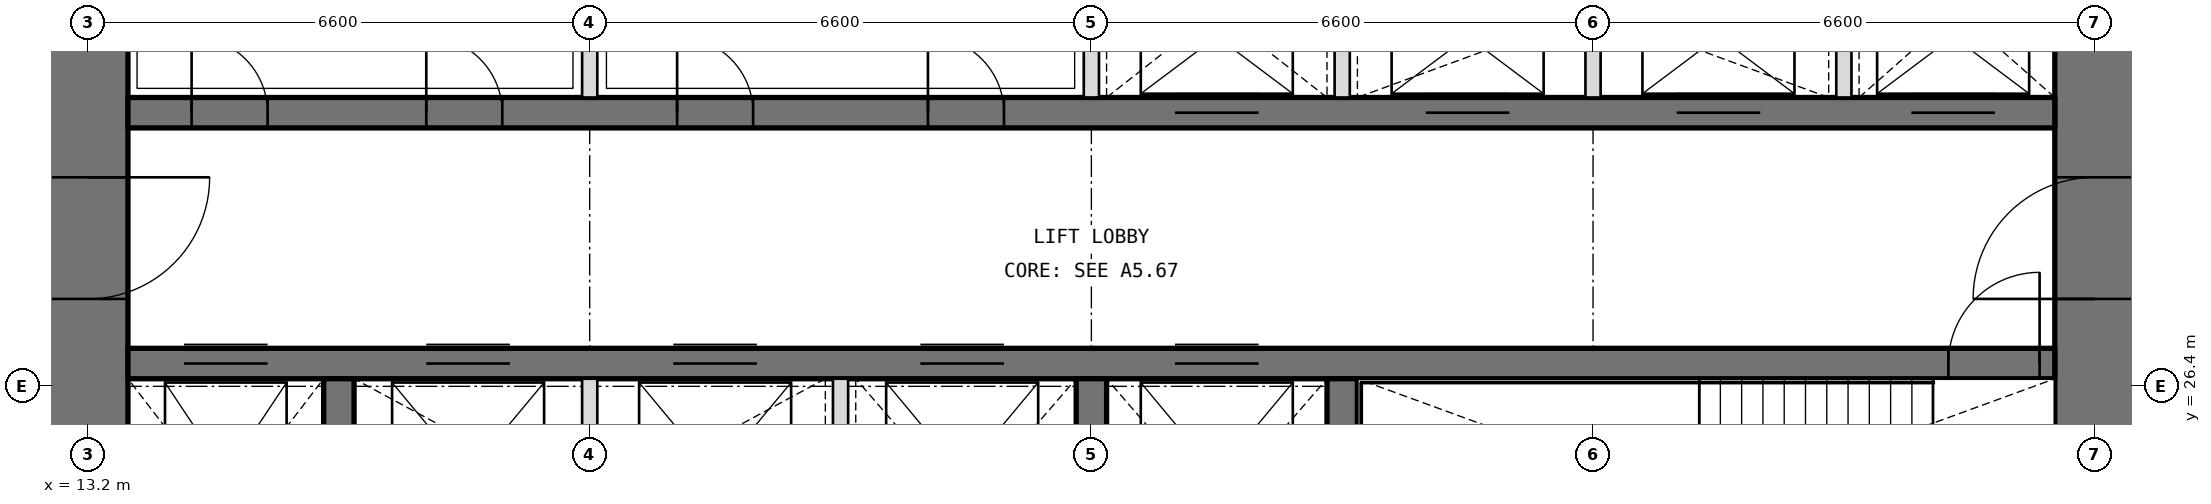
"""IFC4 building model, lengths in metres.
Left out: names, types, materials, properties, quantities, classifications, styles, units other than length and angle.
Written with IfcOpenShell. Run it as: python <this file> out.ifc"""

import sys

from ifc_helpers import new_model, si_unit, direction, frame, frame_2d, origin, place, context, subcontext, project, spatial, rectangle, extrude, element, fill, save


model = new_model("IFC4")
c1 = context("Model", 3, precision=1e-05, world=origin(), true_north=direction((0.0, 1.0)))
c2 = subcontext(c1, "Body", "Model", "MODEL_VIEW")
j1 = project(units=[si_unit("LENGTHUNIT", "METRE"), si_unit("PLANEANGLEUNIT", "RADIAN")], contexts=[c1])
p1 = place(None, origin())
s1 = spatial("IfcSite", under=j1, at=p1, CompositionType="ELEMENT")
p2 = place(p1, origin())
s2 = spatial("IfcBuilding", under=s1, at=p2, CompositionType="ELEMENT")
p3 = place(p2, frame((0.0, 0.0, 283.8)))
s3 = spatial("IfcBuildingStorey", under=s2, at=p3, CompositionType="ELEMENT", Elevation=283.8)
p4 = place(p3, frame((39.6, 13.725, 0.0), z_axis=(0.0, 0.0, 1.0), x_axis=(0.0, 1.0, 0.0)))
e1 = element("IfcWall", 1, at=p4, inside=s3, PredefinedType="SHEAR", context=c2, shape_type="SweptSolid", body=[
    extrude(rectangle(XDim=18.75, YDim=1.05, at=frame_2d((9.375, 0.0))), origin(), (0.0, 0.0, 1.0), 4.2),
])
p5 = place(p4, frame((3.025, 0.0, 0.0)))
e2 = element("IfcOpeningElement", 2, at=p5, cuts=e1, PredefinedType="OPENING", context=c2, shape_type="SweptSolid", body=[
    extrude(rectangle(XDim=1.6, YDim=2.1, at=frame_2d((0.8, 1.05))), frame((0.0, 0.535, 0.0), z_axis=(0.0, -1.0, 0.0), x_axis=(1.0, 0.0, 0.0)), (0.0, 0.0, 1.0), 1.07),
])
p6 = place(p4, frame((13.825, 0.0, 0.0)))
e3 = element("IfcOpeningElement", 3, at=p6, cuts=e1, PredefinedType="OPENING", context=c2, shape_type="SweptSolid", body=[
    extrude(rectangle(XDim=1.6, YDim=2.1, at=frame_2d((0.8, 1.05))), frame((0.0, 0.535, 0.0), z_axis=(0.0, -1.0, 0.0), x_axis=(1.0, 0.0, 0.0)), (0.0, 0.0, 1.0), 1.07),
])
p7 = place(p3, frame((13.2, 32.475, 0.0), z_axis=(0.0, 0.0, 1.0), x_axis=(0.0, -1.0, 0.0)))
e4 = element("IfcWall", 4, at=p7, inside=s3, PredefinedType="SHEAR", context=c2, shape_type="SweptSolid", body=[
    extrude(rectangle(XDim=18.75, YDim=1.05, at=frame_2d((9.375, 0.0))), origin(), (0.0, 0.0, 1.0), 4.2),
])
p8 = place(p7, frame((14.125, 0.0, 0.0)))
e5 = element("IfcOpeningElement", 5, at=p8, cuts=e4, PredefinedType="OPENING", context=c2, shape_type="SweptSolid", body=[
    extrude(rectangle(XDim=1.6, YDim=2.1, at=frame_2d((0.8, 1.05))), frame((0.0, 0.535, 0.0), z_axis=(0.0, -1.0, 0.0), x_axis=(1.0, 0.0, 0.0)), (0.0, 0.0, 1.0), 1.07),
])
p9 = place(p7, frame((3.325, 0.0, 0.0)))
e6 = element("IfcOpeningElement", 6, at=p9, cuts=e4, PredefinedType="OPENING", context=c2, shape_type="SweptSolid", body=[
    extrude(rectangle(XDim=1.6, YDim=2.1, at=frame_2d((0.8, 1.05))), frame((0.0, 0.535, 0.0), z_axis=(0.0, -1.0, 0.0), x_axis=(1.0, 0.0, 0.0)), (0.0, 0.0, 1.0), 1.07),
])
p10 = place(p3, frame((13.725, 26.7, 0.0), z_axis=(0.0, 0.0, 1.0), x_axis=(1.0, 0.0, 0.0)))
e7 = element("IfcWall", 7, at=p10, inside=s3, PredefinedType="SHEAR", context=c2, shape_type="SweptSolid", body=[
    extrude(rectangle(XDim=25.35, YDim=0.4, at=frame_2d((12.675, 0.0))), origin(), (0.0, 0.0, 1.0), 4.2),
])
p11 = place(p10, frame((23.95, 0.0, 0.0)))
e8 = element("IfcOpeningElement", 8, at=p11, cuts=e7, PredefinedType="OPENING", context=c2, shape_type="SweptSolid", body=[
    extrude(rectangle(XDim=1.2, YDim=2.1, at=frame_2d((0.6, 1.05))), frame((0.0, 0.21, 0.0), z_axis=(0.0, -1.0, 0.0), x_axis=(1.0, 0.0, 0.0)), (0.0, 0.0, 1.0), 0.42),
])
p12 = place(p10, frame((0.738, 0.0, 0.0)))
e9 = element("IfcOpeningElement", 9, at=p12, cuts=e7, PredefinedType="OPENING", context=c2, shape_type="SweptSolid", body=[
    extrude(rectangle(XDim=1.1, YDim=2.1, at=frame_2d((0.55, 1.05))), frame((0.0, 0.21, 0.0), z_axis=(0.0, -1.0, 0.0), x_axis=(1.0, 0.0, 0.0)), (0.0, 0.0, 1.0), 0.42),
])
p13 = place(p10, frame((3.925, 0.0, 0.0)))
e10 = element("IfcOpeningElement", 10, at=p13, cuts=e7, PredefinedType="OPENING", context=c2, shape_type="SweptSolid", body=[
    extrude(rectangle(XDim=1.1, YDim=2.1, at=frame_2d((0.55, 1.05))), frame((0.0, 0.21, 0.0), z_axis=(0.0, -1.0, 0.0), x_axis=(1.0, 0.0, 0.0)), (0.0, 0.0, 1.0), 0.42),
])
p14 = place(p10, frame((7.175, 0.0, 0.0)))
e11 = element("IfcOpeningElement", 11, at=p14, cuts=e7, PredefinedType="OPENING", context=c2, shape_type="SweptSolid", body=[
    extrude(rectangle(XDim=1.1, YDim=2.1, at=frame_2d((0.55, 1.05))), frame((0.0, 0.21, 0.0), z_axis=(0.0, -1.0, 0.0), x_axis=(1.0, 0.0, 0.0)), (0.0, 0.0, 1.0), 0.42),
])
p15 = place(p10, frame((10.425, 0.0, 0.0)))
e12 = element("IfcOpeningElement", 12, at=p15, cuts=e7, PredefinedType="OPENING", context=c2, shape_type="SweptSolid", body=[
    extrude(rectangle(XDim=1.1, YDim=2.1, at=frame_2d((0.55, 1.05))), frame((0.0, 0.21, 0.0), z_axis=(0.0, -1.0, 0.0), x_axis=(1.0, 0.0, 0.0)), (0.0, 0.0, 1.0), 0.42),
])
p16 = place(p10, frame((13.775, 0.0, 0.0)))
e13 = element("IfcOpeningElement", 13, at=p16, cuts=e7, PredefinedType="OPENING", context=c2, shape_type="SweptSolid", body=[
    extrude(rectangle(XDim=1.1, YDim=2.1, at=frame_2d((0.55, 1.05))), frame((0.0, 0.21, 0.0), z_axis=(0.0, -1.0, 0.0), x_axis=(1.0, 0.0, 0.0)), (0.0, 0.0, 1.0), 0.42),
])
p17 = place(p3, frame((13.725, 30.0, 0.0), z_axis=(0.0, 0.0, 1.0), x_axis=(1.0, 0.0, 0.0)))
e14 = element("IfcWall", 14, at=p17, inside=s3, PredefinedType="SHEAR", context=c2, shape_type="SweptSolid", body=[
    extrude(rectangle(XDim=25.35, YDim=0.4, at=frame_2d((12.675, 0.0))), origin(), (0.0, 0.0, 1.0), 4.2),
])
p18 = place(p17, frame((0.837, 0.0, 0.0)))
e15 = element("IfcOpeningElement", 15, at=p18, cuts=e14, PredefinedType="OPENING", context=c2, shape_type="SweptSolid", body=[
    extrude(rectangle(XDim=1.0, YDim=2.1, at=frame_2d((0.5, 1.05))), frame((0.0, 0.21, 0.0), z_axis=(0.0, -1.0, 0.0), x_axis=(1.0, 0.0, 0.0)), (0.0, 0.0, 1.0), 0.42),
])
p19 = place(p17, frame((3.925, 0.0, 0.0)))
e16 = element("IfcOpeningElement", 16, at=p19, cuts=e14, PredefinedType="OPENING", context=c2, shape_type="SweptSolid", body=[
    extrude(rectangle(XDim=1.0, YDim=2.1, at=frame_2d((0.5, 1.05))), frame((0.0, 0.21, 0.0), z_axis=(0.0, -1.0, 0.0), x_axis=(1.0, 0.0, 0.0)), (0.0, 0.0, 1.0), 0.42),
])
p20 = place(p17, frame((7.225, 0.0, 0.0)))
e17 = element("IfcOpeningElement", 17, at=p20, cuts=e14, PredefinedType="OPENING", context=c2, shape_type="SweptSolid", body=[
    extrude(rectangle(XDim=1.0, YDim=2.1, at=frame_2d((0.5, 1.05))), frame((0.0, 0.21, 0.0), z_axis=(0.0, -1.0, 0.0), x_axis=(1.0, 0.0, 0.0)), (0.0, 0.0, 1.0), 0.42),
])
p21 = place(p17, frame((10.525, 0.0, 0.0)))
e18 = element("IfcOpeningElement", 18, at=p21, cuts=e14, PredefinedType="OPENING", context=c2, shape_type="SweptSolid", body=[
    extrude(rectangle(XDim=1.0, YDim=2.1, at=frame_2d((0.5, 1.05))), frame((0.0, 0.21, 0.0), z_axis=(0.0, -1.0, 0.0), x_axis=(1.0, 0.0, 0.0)), (0.0, 0.0, 1.0), 0.42),
])
p22 = place(p17, frame((13.775, 0.0, 0.0)))
e19 = element("IfcOpeningElement", 19, at=p22, cuts=e14, PredefinedType="OPENING", context=c2, shape_type="SweptSolid", body=[
    extrude(rectangle(XDim=1.1, YDim=2.1, at=frame_2d((0.55, 1.05))), frame((0.0, 0.21, 0.0), z_axis=(0.0, -1.0, 0.0), x_axis=(1.0, 0.0, 0.0)), (0.0, 0.0, 1.0), 0.42),
])
p23 = place(p17, frame((17.075, 0.0, 0.0)))
e20 = element("IfcOpeningElement", 20, at=p23, cuts=e14, PredefinedType="OPENING", context=c2, shape_type="SweptSolid", body=[
    extrude(rectangle(XDim=1.1, YDim=2.1, at=frame_2d((0.55, 1.05))), frame((0.0, 0.21, 0.0), z_axis=(0.0, -1.0, 0.0), x_axis=(1.0, 0.0, 0.0)), (0.0, 0.0, 1.0), 0.42),
])
p24 = place(p17, frame((20.375, 0.0, 0.0)))
e21 = element("IfcOpeningElement", 21, at=p24, cuts=e14, PredefinedType="OPENING", context=c2, shape_type="SweptSolid", body=[
    extrude(rectangle(XDim=1.1, YDim=2.1, at=frame_2d((0.55, 1.05))), frame((0.0, 0.21, 0.0), z_axis=(0.0, -1.0, 0.0), x_axis=(1.0, 0.0, 0.0)), (0.0, 0.0, 1.0), 0.42),
])
p25 = place(p17, frame((23.462, 0.0, 0.0)))
e22 = element("IfcOpeningElement", 22, at=p25, cuts=e14, PredefinedType="OPENING", context=c2, shape_type="SweptSolid", body=[
    extrude(rectangle(XDim=1.1, YDim=2.1, at=frame_2d((0.55, 1.05))), frame((0.0, 0.21, 0.0), z_axis=(0.0, -1.0, 0.0), x_axis=(1.0, 0.0, 0.0)), (0.0, 0.0, 1.0), 0.42),
])
for number, where, z_axis, x_axis in (
    (23, (16.5, 23.15, 0.0), (0.0, 0.0, 1.0), (0.0, 1.0, 0.0)),
    (24, (26.4, 23.15, 0.0), (0.0, 0.0, 1.0), (0.0, 1.0, 0.0)),
    (25, (29.7, 23.15, 0.0), (0.0, 0.0, 1.0), (0.0, 1.0, 0.0)),
):
    element("IfcWall", number, at=place(p3, frame(where, z_axis=z_axis, x_axis=x_axis)), inside=s3, PredefinedType="SHEAR", context=c2, shape_type="SweptSolid", body=[
        extrude(rectangle(XDim=3.35, YDim=0.4, at=frame_2d((1.675, 0.0))), origin(), (0.0, 0.0, 1.0), 4.2),
    ])
for number, where, z_axis, x_axis in (
    (26, (19.8, 30.2, 0.0), (0.0, 0.0, 1.0), (0.0, 1.0, 0.0)),
    (27, (26.4, 30.2, 0.0), (0.0, 0.0, 1.0), (0.0, 1.0, 0.0)),
    (28, (29.7, 30.2, 0.0), (0.0, 0.0, 1.0), (0.0, 1.0, 0.0)),
    (29, (33.0, 30.2, 0.0), (0.0, 0.0, 1.0), (0.0, 1.0, 0.0)),
    (30, (36.3, 30.2, 0.0), (0.0, 0.0, 1.0), (0.0, 1.0, 0.0)),
):
    element("IfcWall", number, at=place(p3, frame(where, z_axis=z_axis, x_axis=x_axis)), inside=s3, PredefinedType="PARTITIONING", context=c2, shape_type="SweptSolid", body=[
        extrude(rectangle(XDim=2.275, YDim=0.2, at=frame_2d((1.138, 0.0))), origin(), (0.0, 0.0, 1.0), 4.2),
    ])
for number, where, z_axis, x_axis in (
    (31, (19.8, 23.15, 0.0), (0.0, 0.0, 1.0), (0.0, 1.0, 0.0)),
    (32, (23.1, 23.15, 0.0), (0.0, 0.0, 1.0), (0.0, 1.0, 0.0)),
):
    element("IfcWall", number, at=place(p3, frame(where, z_axis=z_axis, x_axis=x_axis)), inside=s3, PredefinedType="PARTITIONING", context=c2, shape_type="SweptSolid", body=[
        extrude(rectangle(XDim=3.35, YDim=0.2, at=frame_2d((1.675, 0.0))), origin(), (0.0, 0.0, 1.0), 4.2),
    ])
p26 = place(p18, origin())
e33 = element("IfcDoor", 33, at=p26, inside=s3, OperationType="SINGLE_SWING_LEFT", PredefinedType="DOOR", context=c2, shape_type="SweptSolid", body=[
    extrude(rectangle(XDim=1.0, YDim=2.1, at=frame_2d((0.5, 1.05))), frame((0.0, 0.025, 0.0), z_axis=(0.0, -1.0, 0.0), x_axis=(1.0, 0.0, 0.0)), (0.0, 0.0, 1.0), 0.05),
])
fill(e15, e33)
p27 = place(p19, origin())
e34 = element("IfcDoor", 34, at=p27, inside=s3, OperationType="SINGLE_SWING_LEFT", PredefinedType="DOOR", context=c2, shape_type="SweptSolid", body=[
    extrude(rectangle(XDim=1.0, YDim=2.1, at=frame_2d((0.5, 1.05))), frame((0.0, 0.025, 0.0), z_axis=(0.0, -1.0, 0.0), x_axis=(1.0, 0.0, 0.0)), (0.0, 0.0, 1.0), 0.05),
])
fill(e16, e34)
p28 = place(p20, origin())
e35 = element("IfcDoor", 35, at=p28, inside=s3, OperationType="SINGLE_SWING_LEFT", PredefinedType="DOOR", context=c2, shape_type="SweptSolid", body=[
    extrude(rectangle(XDim=1.0, YDim=2.1, at=frame_2d((0.5, 1.05))), frame((0.0, 0.025, 0.0), z_axis=(0.0, -1.0, 0.0), x_axis=(1.0, 0.0, 0.0)), (0.0, 0.0, 1.0), 0.05),
])
fill(e17, e35)
p29 = place(p21, origin())
e36 = element("IfcDoor", 36, at=p29, inside=s3, OperationType="SINGLE_SWING_LEFT", PredefinedType="DOOR", context=c2, shape_type="SweptSolid", body=[
    extrude(rectangle(XDim=1.0, YDim=2.1, at=frame_2d((0.5, 1.05))), frame((0.0, 0.025, 0.0), z_axis=(0.0, -1.0, 0.0), x_axis=(1.0, 0.0, 0.0)), (0.0, 0.0, 1.0), 0.05),
])
fill(e18, e36)
p30 = place(p11, origin())
e37 = element("IfcDoor", 37, at=p30, inside=s3, OperationType="SINGLE_SWING_RIGHT", PredefinedType="DOOR", context=c2, shape_type="SweptSolid", body=[
    extrude(rectangle(XDim=1.2, YDim=2.1, at=frame_2d((0.6, 1.05))), frame((0.0, 0.025, 0.0), z_axis=(0.0, -1.0, 0.0), x_axis=(1.0, 0.0, 0.0)), (0.0, 0.0, 1.0), 0.05),
])
fill(e8, e37)
p31 = place(p9, origin())
e38 = element("IfcDoor", 38, at=p31, inside=s3, OperationType="DOUBLE_DOOR_DOUBLE_SWING", PredefinedType="DOOR", context=c2, shape_type="SweptSolid", body=[
    extrude(rectangle(XDim=1.6, YDim=2.1, at=frame_2d((0.8, 1.05))), frame((0.0, 0.025, 0.0), z_axis=(0.0, -1.0, 0.0), x_axis=(1.0, 0.0, 0.0)), (0.0, 0.0, 1.0), 0.05),
])
fill(e6, e38)
p32 = place(p6, origin())
e39 = element("IfcDoor", 39, at=p32, inside=s3, OperationType="DOUBLE_DOOR_DOUBLE_SWING", PredefinedType="DOOR", context=c2, shape_type="SweptSolid", body=[
    extrude(rectangle(XDim=1.6, YDim=2.1, at=frame_2d((0.8, 1.05))), frame((0.0, 0.025, 0.0), z_axis=(0.0, -1.0, 0.0), x_axis=(1.0, 0.0, 0.0)), (0.0, 0.0, 1.0), 0.05),
])
fill(e3, e39)
p33 = place(p22, origin())
e40 = element("IfcDoor", 40, at=p33, inside=s3, OperationType="DOUBLE_DOOR_SLIDING", PredefinedType="DOOR", context=c2, shape_type="SweptSolid", body=[
    extrude(rectangle(XDim=1.1, YDim=2.1, at=frame_2d((0.55, 1.05))), frame((0.0, 0.025, 0.0), z_axis=(0.0, -1.0, 0.0), x_axis=(1.0, 0.0, 0.0)), (0.0, 0.0, 1.0), 0.05),
])
fill(e19, e40)
p34 = place(p23, origin())
e41 = element("IfcDoor", 41, at=p34, inside=s3, OperationType="DOUBLE_DOOR_SLIDING", PredefinedType="DOOR", context=c2, shape_type="SweptSolid", body=[
    extrude(rectangle(XDim=1.1, YDim=2.1, at=frame_2d((0.55, 1.05))), frame((0.0, 0.025, 0.0), z_axis=(0.0, -1.0, 0.0), x_axis=(1.0, 0.0, 0.0)), (0.0, 0.0, 1.0), 0.05),
])
fill(e20, e41)
p35 = place(p24, origin())
e42 = element("IfcDoor", 42, at=p35, inside=s3, OperationType="DOUBLE_DOOR_SLIDING", PredefinedType="DOOR", context=c2, shape_type="SweptSolid", body=[
    extrude(rectangle(XDim=1.1, YDim=2.1, at=frame_2d((0.55, 1.05))), frame((0.0, 0.025, 0.0), z_axis=(0.0, -1.0, 0.0), x_axis=(1.0, 0.0, 0.0)), (0.0, 0.0, 1.0), 0.05),
])
fill(e21, e42)
p36 = place(p25, origin())
e43 = element("IfcDoor", 43, at=p36, inside=s3, OperationType="DOUBLE_DOOR_SLIDING", PredefinedType="DOOR", context=c2, shape_type="SweptSolid", body=[
    extrude(rectangle(XDim=1.1, YDim=2.1, at=frame_2d((0.55, 1.05))), frame((0.0, 0.025, 0.0), z_axis=(0.0, -1.0, 0.0), x_axis=(1.0, 0.0, 0.0)), (0.0, 0.0, 1.0), 0.05),
])
fill(e22, e43)
p37 = place(p12, origin())
e44 = element("IfcDoor", 44, at=p37, inside=s3, OperationType="DOUBLE_DOOR_SLIDING", PredefinedType="DOOR", context=c2, shape_type="SweptSolid", body=[
    extrude(rectangle(XDim=1.1, YDim=2.1, at=frame_2d((0.55, 1.05))), frame((0.0, 0.025, 0.0), z_axis=(0.0, -1.0, 0.0), x_axis=(1.0, 0.0, 0.0)), (0.0, 0.0, 1.0), 0.05),
])
fill(e9, e44)
p38 = place(p13, origin())
e45 = element("IfcDoor", 45, at=p38, inside=s3, OperationType="DOUBLE_DOOR_SLIDING", PredefinedType="DOOR", context=c2, shape_type="SweptSolid", body=[
    extrude(rectangle(XDim=1.1, YDim=2.1, at=frame_2d((0.55, 1.05))), frame((0.0, 0.025, 0.0), z_axis=(0.0, -1.0, 0.0), x_axis=(1.0, 0.0, 0.0)), (0.0, 0.0, 1.0), 0.05),
])
fill(e10, e45)
p39 = place(p14, origin())
e46 = element("IfcDoor", 46, at=p39, inside=s3, OperationType="DOUBLE_DOOR_SLIDING", PredefinedType="DOOR", context=c2, shape_type="SweptSolid", body=[
    extrude(rectangle(XDim=1.1, YDim=2.1, at=frame_2d((0.55, 1.05))), frame((0.0, 0.025, 0.0), z_axis=(0.0, -1.0, 0.0), x_axis=(1.0, 0.0, 0.0)), (0.0, 0.0, 1.0), 0.05),
])
fill(e11, e46)
p40 = place(p15, origin())
e47 = element("IfcDoor", 47, at=p40, inside=s3, OperationType="DOUBLE_DOOR_SLIDING", PredefinedType="DOOR", context=c2, shape_type="SweptSolid", body=[
    extrude(rectangle(XDim=1.1, YDim=2.1, at=frame_2d((0.55, 1.05))), frame((0.0, 0.025, 0.0), z_axis=(0.0, -1.0, 0.0), x_axis=(1.0, 0.0, 0.0)), (0.0, 0.0, 1.0), 0.05),
])
fill(e12, e47)
p41 = place(p16, origin())
e48 = element("IfcDoor", 48, at=p41, inside=s3, OperationType="DOUBLE_DOOR_SLIDING", PredefinedType="DOOR", context=c2, shape_type="SweptSolid", body=[
    extrude(rectangle(XDim=1.1, YDim=2.1, at=frame_2d((0.55, 1.05))), frame((0.0, 0.025, 0.0), z_axis=(0.0, -1.0, 0.0), x_axis=(1.0, 0.0, 0.0)), (0.0, 0.0, 1.0), 0.05),
])
fill(e13, e48)
save(model, sys.argv[1])
